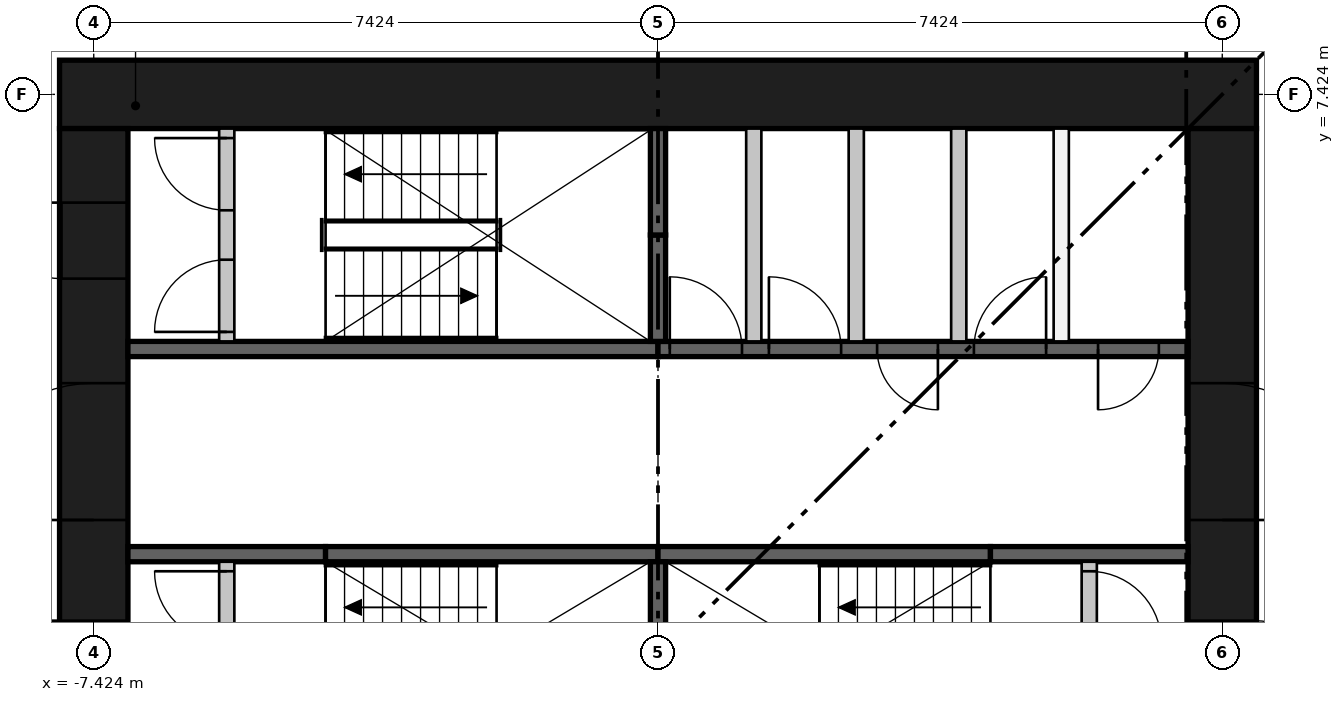
"""IFC4 building model, lengths in metres.
Left out: names, types, materials, properties, quantities, classifications, styles, units other than length and angle.
Written with IfcOpenShell. Run it as: python <this file> out.ifc"""

import sys

from ifc_helpers import new_model, si_unit, direction, frame, frame_2d, origin, place, context, subcontext, project, spatial, rectangle, extrude, element, fill, save


model = new_model("IFC4")
c1 = context("Model", 3, precision=1e-05, world=origin(), true_north=direction((0.0, 1.0)))
c2 = subcontext(c1, "Body", "Model", "MODEL_VIEW")
j1 = project(units=[si_unit("LENGTHUNIT", "METRE"), si_unit("PLANEANGLEUNIT", "RADIAN")], contexts=[c1])
p1 = place(None, origin())
s1 = spatial("IfcSite", under=j1, at=p1, CompositionType="ELEMENT")
p2 = place(p1, origin())
s2 = spatial("IfcBuilding", under=s1, at=p2, CompositionType="ELEMENT")
p3 = place(p2, frame((0.0, 0.0, 55.4)))
s3 = spatial("IfcBuildingStorey", under=s2, at=p3, CompositionType="ELEMENT", Elevation=55.4)
p4 = place(p3, frame((-7.874, 7.424, 0.0), z_axis=(0.0, 0.0, 1.0), x_axis=(1.0, 0.0, 0.0)))
e1 = element("IfcWall", 1, at=p4, inside=s3, PredefinedType="SHEAR", context=c2, shape_type="SweptSolid", body=[
    extrude(rectangle(XDim=15.748, YDim=0.9, at=frame_2d((7.874, 0.0))), origin(), (0.0, 0.0, 1.0), 3.65),
])
p5 = place(p3, frame((-7.424, -6.974, 0.0), z_axis=(0.0, 0.0, 1.0), x_axis=(0.0, 1.0, 0.0)))
e2 = element("IfcWall", 2, at=p5, inside=s3, PredefinedType="SHEAR", context=c2, shape_type="SweptSolid", body=[
    extrude(rectangle(XDim=13.948, YDim=0.9, at=frame_2d((6.974, 0.0))), origin(), (0.0, 0.0, 1.0), 3.65),
])
p6 = place(p5, frame((6.474, 0.0, 0.0)))
e3 = element("IfcOpeningElement", 3, at=p6, cuts=e2, PredefinedType="OPENING", context=c2, shape_type="SweptSolid", body=[
    extrude(rectangle(XDim=1.0, YDim=2.1, at=frame_2d((0.5, 1.05))), frame((0.0, 0.46, 0.0), z_axis=(0.0, -1.0, 0.0), x_axis=(1.0, 0.0, 0.0)), (0.0, 0.0, 1.0), 0.92),
])
p7 = place(p5, frame((3.35, 0.0, 0.0)))
e4 = element("IfcOpeningElement", 4, at=p7, cuts=e2, PredefinedType="OPENING", context=c2, shape_type="SweptSolid", body=[
    extrude(rectangle(XDim=1.8, YDim=2.1, at=frame_2d((0.9, 1.05))), frame((0.0, 0.46, 0.0), z_axis=(0.0, -1.0, 0.0), x_axis=(1.0, 0.0, 0.0)), (0.0, 0.0, 1.0), 0.92),
])
p8 = place(p5, frame((8.799, 0.0, 0.0)))
e5 = element("IfcOpeningElement", 5, at=p8, cuts=e2, PredefinedType="OPENING", context=c2, shape_type="SweptSolid", body=[
    extrude(rectangle(XDim=1.8, YDim=2.1, at=frame_2d((0.9, 1.05))), frame((0.0, 0.46, 0.0), z_axis=(0.0, -1.0, 0.0), x_axis=(1.0, 0.0, 0.0)), (0.0, 0.0, 1.0), 0.92),
])
p9 = place(p5, frame((11.974, 0.0, 0.0)))
e6 = element("IfcOpeningElement", 6, at=p9, cuts=e2, PredefinedType="OPENING", context=c2, shape_type="SweptSolid", body=[
    extrude(rectangle(XDim=1.0, YDim=2.1, at=frame_2d((0.5, 1.05))), frame((0.0, 0.46, 0.0), z_axis=(0.0, -1.0, 0.0), x_axis=(1.0, 0.0, 0.0)), (0.0, 0.0, 1.0), 0.92),
])
p10 = place(p3, frame((7.424, -6.974, 0.0), z_axis=(0.0, 0.0, 1.0), x_axis=(0.0, 1.0, 0.0)))
e7 = element("IfcWall", 7, at=p10, inside=s3, PredefinedType="SHEAR", context=c2, shape_type="SweptSolid", body=[
    extrude(rectangle(XDim=13.948, YDim=0.9, at=frame_2d((6.974, 0.0))), origin(), (0.0, 0.0, 1.0), 3.65),
])
p11 = place(p10, frame((6.474, 0.0, 0.0)))
e8 = element("IfcOpeningElement", 8, at=p11, cuts=e7, PredefinedType="OPENING", context=c2, shape_type="SweptSolid", body=[
    extrude(rectangle(XDim=1.0, YDim=2.1, at=frame_2d((0.5, 1.05))), frame((0.0, 0.46, 0.0), z_axis=(0.0, -1.0, 0.0), x_axis=(1.0, 0.0, 0.0)), (0.0, 0.0, 1.0), 0.92),
])
p12 = place(p10, frame((3.35, 0.0, 0.0)))
e9 = element("IfcOpeningElement", 9, at=p12, cuts=e7, PredefinedType="OPENING", context=c2, shape_type="SweptSolid", body=[
    extrude(rectangle(XDim=1.8, YDim=2.1, at=frame_2d((0.9, 1.05))), frame((0.0, 0.46, 0.0), z_axis=(0.0, -1.0, 0.0), x_axis=(1.0, 0.0, 0.0)), (0.0, 0.0, 1.0), 0.92),
])
p13 = place(p10, frame((8.799, 0.0, 0.0)))
e10 = element("IfcOpeningElement", 10, at=p13, cuts=e7, PredefinedType="OPENING", context=c2, shape_type="SweptSolid", body=[
    extrude(rectangle(XDim=1.8, YDim=2.1, at=frame_2d((0.9, 1.05))), frame((0.0, 0.46, 0.0), z_axis=(0.0, -1.0, 0.0), x_axis=(1.0, 0.0, 0.0)), (0.0, 0.0, 1.0), 0.92),
])
p14 = place(p3, frame((-6.974, 4.074, 0.0), z_axis=(0.0, 0.0, 1.0), x_axis=(1.0, 0.0, 0.0)))
e11 = element("IfcWall", 11, at=p14, inside=s3, PredefinedType="SHEAR", context=c2, shape_type="SweptSolid", body=[
    extrude(rectangle(XDim=6.974, YDim=0.2, at=frame_2d((3.487, 0.0))), origin(), (0.0, 0.0, 1.0), 3.3),
])
p15 = place(p3, frame((0.0, 4.074, 0.0), z_axis=(0.0, 0.0, 1.0), x_axis=(1.0, 0.0, 0.0)))
e12 = element("IfcWall", 12, at=p15, inside=s3, PredefinedType="SHEAR", context=c2, shape_type="SweptSolid", body=[
    extrude(rectangle(XDim=6.974, YDim=0.2, at=frame_2d((3.487, 0.0))), origin(), (0.0, 0.0, 1.0), 3.3),
])
p16 = place(p15, frame((0.155, 0.0, 0.0)))
e13 = element("IfcOpeningElement", 13, at=p16, cuts=e12, PredefinedType="OPENING", context=c2, shape_type="SweptSolid", body=[
    extrude(rectangle(XDim=0.95, YDim=2.1, at=frame_2d((0.475, 1.05))), frame((0.0, 0.11, 0.0), z_axis=(0.0, -1.0, 0.0), x_axis=(1.0, 0.0, 0.0)), (0.0, 0.0, 1.0), 0.22),
])
p17 = place(p15, frame((1.459, 0.0, 0.0)))
e14 = element("IfcOpeningElement", 14, at=p17, cuts=e12, PredefinedType="OPENING", context=c2, shape_type="SweptSolid", body=[
    extrude(rectangle(XDim=0.95, YDim=2.1, at=frame_2d((0.475, 1.05))), frame((0.0, 0.11, 0.0), z_axis=(0.0, -1.0, 0.0), x_axis=(1.0, 0.0, 0.0)), (0.0, 0.0, 1.0), 0.22),
])
p18 = place(p15, frame((2.883, 0.0, 0.0)))
e15 = element("IfcOpeningElement", 15, at=p18, cuts=e12, PredefinedType="OPENING", context=c2, shape_type="SweptSolid", body=[
    extrude(rectangle(XDim=0.8, YDim=2.1, at=frame_2d((0.4, 1.05))), frame((0.0, 0.11, 0.0), z_axis=(0.0, -1.0, 0.0), x_axis=(1.0, 0.0, 0.0)), (0.0, 0.0, 1.0), 0.22),
])
p19 = place(p15, frame((4.156, 0.0, 0.0)))
e16 = element("IfcOpeningElement", 16, at=p19, cuts=e12, PredefinedType="OPENING", context=c2, shape_type="SweptSolid", body=[
    extrude(rectangle(XDim=0.95, YDim=2.1, at=frame_2d((0.475, 1.05))), frame((0.0, 0.11, 0.0), z_axis=(0.0, -1.0, 0.0), x_axis=(1.0, 0.0, 0.0)), (0.0, 0.0, 1.0), 0.22),
])
p20 = place(p15, frame((5.79, 0.0, 0.0)))
e17 = element("IfcOpeningElement", 17, at=p20, cuts=e12, PredefinedType="OPENING", context=c2, shape_type="SweptSolid", body=[
    extrude(rectangle(XDim=0.8, YDim=2.1, at=frame_2d((0.4, 1.05))), frame((0.0, 0.11, 0.0), z_axis=(0.0, -1.0, 0.0), x_axis=(1.0, 0.0, 0.0)), (0.0, 0.0, 1.0), 0.22),
])
p21 = place(p3, frame((-6.974, 1.375, 0.0), z_axis=(0.0, 0.0, 1.0), x_axis=(1.0, 0.0, 0.0)))
e18 = element("IfcWall", 18, at=p21, inside=s3, PredefinedType="SHEAR", context=c2, shape_type="SweptSolid", body=[
    extrude(rectangle(XDim=2.6, YDim=0.2, at=frame_2d((1.3, 0.0))), origin(), (0.0, 0.0, 1.0), 3.3),
])
for number, where, z_axis, x_axis in (
    (19, (-4.374, 1.375, 0.0), (0.0, 0.0, 1.0), (1.0, 0.0, 0.0)),
    (20, (0.0, 1.375, 0.0), (0.0, 0.0, 1.0), (1.0, 0.0, 0.0)),
):
    element("IfcWall", number, at=place(p3, frame(where, z_axis=z_axis, x_axis=x_axis)), inside=s3, PredefinedType="SHEAR", context=c2, shape_type="SweptSolid", body=[
        extrude(rectangle(XDim=4.374, YDim=0.2, at=frame_2d((2.187, 0.0))), origin(), (0.0, 0.0, 1.0), 3.3),
    ])
p22 = place(p3, frame((4.374, 1.375, 0.0), z_axis=(0.0, 0.0, 1.0), x_axis=(1.0, 0.0, 0.0)))
e21 = element("IfcWall", 21, at=p22, inside=s3, PredefinedType="SHEAR", context=c2, shape_type="SweptSolid", body=[
    extrude(rectangle(XDim=2.6, YDim=0.2, at=frame_2d((1.3, 0.0))), origin(), (0.0, 0.0, 1.0), 3.3),
])
p23 = place(p3, frame((0.0, -1.275, 0.0), z_axis=(0.0, 0.0, 1.0), x_axis=(0.0, 1.0, 0.0)))
e22 = element("IfcWall", 22, at=p23, inside=s3, PredefinedType="SHEAR", context=c2, shape_type="SweptSolid", body=[
    extrude(rectangle(XDim=2.55, YDim=0.2, at=frame_2d((1.275, 0.0))), origin(), (0.0, 0.0, 1.0), 3.3),
])
p24 = place(p3, frame((0.0, 4.174, 0.0), z_axis=(0.0, 0.0, 1.0), x_axis=(0.0, 1.0, 0.0)))
e23 = element("IfcWall", 23, at=p24, inside=s3, PredefinedType="SHEAR", context=c2, shape_type="SweptSolid", body=[
    extrude(rectangle(XDim=1.4, YDim=0.2, at=frame_2d((0.7, 0.0))), origin(), (0.0, 0.0, 1.0), 3.3),
])
p25 = place(p3, frame((0.0, 5.574, 0.0), z_axis=(0.0, 0.0, 1.0), x_axis=(0.0, 1.0, 0.0)))
e24 = element("IfcWall", 24, at=p25, inside=s3, PredefinedType="SHEAR", context=c2, shape_type="SweptSolid", body=[
    extrude(rectangle(XDim=1.4, YDim=0.2, at=frame_2d((0.7, 0.0))), origin(), (0.0, 0.0, 1.0), 3.3),
])
for number, where, z_axis, x_axis in (
    (25, (1.26, 4.174, 0.0), (0.0, 0.0, 1.0), (0.0, 1.0, 0.0)),
    (26, (2.609, 4.174, 0.0), (0.0, 0.0, 1.0), (0.0, 1.0, 0.0)),
    (27, (3.957, 4.174, 0.0), (0.0, 0.0, 1.0), (0.0, 1.0, 0.0)),
    (28, (5.305, 4.174, 0.0), (0.0, 0.0, 1.0), (0.0, 1.0, 0.0)),
):
    element("IfcWall", number, at=place(p3, frame(where, z_axis=z_axis, x_axis=x_axis)), inside=s3, PredefinedType="PARTITIONING", context=c2, shape_type="SweptSolid", body=[
        extrude(rectangle(XDim=2.8, YDim=0.2, at=frame_2d((1.4, 0.0))), origin(), (0.0, 0.0, 1.0), 3.3),
    ])
p26 = place(p3, frame((-5.674, -1.275, 0.0), z_axis=(0.0, 0.0, 1.0), x_axis=(0.0, 1.0, 0.0)))
e29 = element("IfcWall", 29, at=p26, inside=s3, PredefinedType="PARTITIONING", context=c2, shape_type="SweptSolid", body=[
    extrude(rectangle(XDim=2.55, YDim=0.2, at=frame_2d((1.275, 0.0))), origin(), (0.0, 0.0, 1.0), 3.3),
])
p27 = place(p26, frame((0.125, 0.0, 0.0)))
e30 = element("IfcOpeningElement", 30, at=p27, cuts=e29, PredefinedType="OPENING", context=c2, shape_type="SweptSolid", body=[
    extrude(rectangle(XDim=0.95, YDim=2.1, at=frame_2d((0.475, 1.05))), frame((0.0, 0.11, 0.0), z_axis=(0.0, -1.0, 0.0), x_axis=(1.0, 0.0, 0.0)), (0.0, 0.0, 1.0), 0.22),
])
p28 = place(p26, frame((1.475, 0.0, 0.0)))
e31 = element("IfcOpeningElement", 31, at=p28, cuts=e29, PredefinedType="OPENING", context=c2, shape_type="SweptSolid", body=[
    extrude(rectangle(XDim=0.95, YDim=2.1, at=frame_2d((0.475, 1.05))), frame((0.0, 0.11, 0.0), z_axis=(0.0, -1.0, 0.0), x_axis=(1.0, 0.0, 0.0)), (0.0, 0.0, 1.0), 0.22),
])
p29 = place(p3, frame((5.674, -1.275, 0.0), z_axis=(0.0, 0.0, 1.0), x_axis=(0.0, 1.0, 0.0)))
e32 = element("IfcWall", 32, at=p29, inside=s3, PredefinedType="PARTITIONING", context=c2, shape_type="SweptSolid", body=[
    extrude(rectangle(XDim=2.55, YDim=0.2, at=frame_2d((1.275, 0.0))), origin(), (0.0, 0.0, 1.0), 3.3),
])
p30 = place(p29, frame((0.125, 0.0, 0.0)))
e33 = element("IfcOpeningElement", 33, at=p30, cuts=e32, PredefinedType="OPENING", context=c2, shape_type="SweptSolid", body=[
    extrude(rectangle(XDim=0.95, YDim=2.1, at=frame_2d((0.475, 1.05))), frame((0.0, 0.11, 0.0), z_axis=(0.0, -1.0, 0.0), x_axis=(1.0, 0.0, 0.0)), (0.0, 0.0, 1.0), 0.22),
])
p31 = place(p29, frame((1.475, 0.0, 0.0)))
e34 = element("IfcOpeningElement", 34, at=p31, cuts=e32, PredefinedType="OPENING", context=c2, shape_type="SweptSolid", body=[
    extrude(rectangle(XDim=0.95, YDim=2.1, at=frame_2d((0.475, 1.05))), frame((0.0, 0.11, 0.0), z_axis=(0.0, -1.0, 0.0), x_axis=(1.0, 0.0, 0.0)), (0.0, 0.0, 1.0), 0.22),
])
p32 = place(p3, frame((-5.674, 4.174, 0.0), z_axis=(0.0, 0.0, 1.0), x_axis=(0.0, 1.0, 0.0)))
e35 = element("IfcWall", 35, at=p32, inside=s3, PredefinedType="PARTITIONING", context=c2, shape_type="SweptSolid", body=[
    extrude(rectangle(XDim=2.8, YDim=0.2, at=frame_2d((1.4, 0.0))), origin(), (0.0, 0.0, 1.0), 3.3),
])
p33 = place(p32, frame((0.125, 0.0, 0.0)))
e36 = element("IfcOpeningElement", 36, at=p33, cuts=e35, PredefinedType="OPENING", context=c2, shape_type="SweptSolid", body=[
    extrude(rectangle(XDim=0.95, YDim=2.1, at=frame_2d((0.475, 1.05))), frame((0.0, 0.11, 0.0), z_axis=(0.0, -1.0, 0.0), x_axis=(1.0, 0.0, 0.0)), (0.0, 0.0, 1.0), 0.22),
])
p34 = place(p32, frame((1.725, 0.0, 0.0)))
e37 = element("IfcOpeningElement", 37, at=p34, cuts=e35, PredefinedType="OPENING", context=c2, shape_type="SweptSolid", body=[
    extrude(rectangle(XDim=0.95, YDim=2.1, at=frame_2d((0.475, 1.05))), frame((0.0, 0.11, 0.0), z_axis=(0.0, -1.0, 0.0), x_axis=(1.0, 0.0, 0.0)), (0.0, 0.0, 1.0), 0.22),
])
p35 = place(p28, origin())
e38 = element("IfcDoor", 38, at=p35, inside=s3, OperationType="SINGLE_SWING_RIGHT", PredefinedType="DOOR", context=c2, shape_type="SweptSolid", body=[
    extrude(rectangle(XDim=0.95, YDim=2.1, at=frame_2d((0.475, 1.05))), frame((0.0, 0.025, 0.0), z_axis=(0.0, -1.0, 0.0), x_axis=(1.0, 0.0, 0.0)), (0.0, 0.0, 1.0), 0.05),
])
fill(e31, e38)
p36 = place(p31, frame((0.95, 0.0, 0.0), z_axis=(0.0, 0.0, 1.0), x_axis=(-1.0, 0.0, 0.0)))
e39 = element("IfcDoor", 39, at=p36, inside=s3, OperationType="SINGLE_SWING_LEFT", PredefinedType="DOOR", context=c2, shape_type="SweptSolid", body=[
    extrude(rectangle(XDim=0.95, YDim=2.1, at=frame_2d((0.475, 1.05))), frame((0.0, 0.025, 0.0), z_axis=(0.0, -1.0, 0.0), x_axis=(1.0, 0.0, 0.0)), (0.0, 0.0, 1.0), 0.05),
])
fill(e34, e39)
p37 = place(p33, origin())
e40 = element("IfcDoor", 40, at=p37, inside=s3, OperationType="SINGLE_SWING_LEFT", PredefinedType="DOOR", context=c2, shape_type="SweptSolid", body=[
    extrude(rectangle(XDim=0.95, YDim=2.1, at=frame_2d((0.475, 1.05))), frame((0.0, 0.025, 0.0), z_axis=(0.0, -1.0, 0.0), x_axis=(1.0, 0.0, 0.0)), (0.0, 0.0, 1.0), 0.05),
])
fill(e36, e40)
p38 = place(p34, origin())
e41 = element("IfcDoor", 41, at=p38, inside=s3, OperationType="SINGLE_SWING_RIGHT", PredefinedType="DOOR", context=c2, shape_type="SweptSolid", body=[
    extrude(rectangle(XDim=0.95, YDim=2.1, at=frame_2d((0.475, 1.05))), frame((0.0, 0.025, 0.0), z_axis=(0.0, -1.0, 0.0), x_axis=(1.0, 0.0, 0.0)), (0.0, 0.0, 1.0), 0.05),
])
fill(e37, e41)
p39 = place(p16, origin())
e42 = element("IfcDoor", 42, at=p39, inside=s3, OperationType="SINGLE_SWING_LEFT", PredefinedType="DOOR", context=c2, shape_type="SweptSolid", body=[
    extrude(rectangle(XDim=0.95, YDim=2.1, at=frame_2d((0.475, 1.05))), frame((0.0, 0.025, 0.0), z_axis=(0.0, -1.0, 0.0), x_axis=(1.0, 0.0, 0.0)), (0.0, 0.0, 1.0), 0.05),
])
fill(e13, e42)
p40 = place(p17, origin())
e43 = element("IfcDoor", 43, at=p40, inside=s3, OperationType="SINGLE_SWING_LEFT", PredefinedType="DOOR", context=c2, shape_type="SweptSolid", body=[
    extrude(rectangle(XDim=0.95, YDim=2.1, at=frame_2d((0.475, 1.05))), frame((0.0, 0.025, 0.0), z_axis=(0.0, -1.0, 0.0), x_axis=(1.0, 0.0, 0.0)), (0.0, 0.0, 1.0), 0.05),
])
fill(e14, e43)
p41 = place(p18, frame((0.8, 0.0, 0.0), z_axis=(0.0, 0.0, 1.0), x_axis=(-1.0, 0.0, 0.0)))
e44 = element("IfcDoor", 44, at=p41, inside=s3, OperationType="SINGLE_SWING_RIGHT", PredefinedType="DOOR", context=c2, shape_type="SweptSolid", body=[
    extrude(rectangle(XDim=0.8, YDim=2.1, at=frame_2d((0.4, 1.05))), frame((0.0, 0.025, 0.0), z_axis=(0.0, -1.0, 0.0), x_axis=(1.0, 0.0, 0.0)), (0.0, 0.0, 1.0), 0.05),
])
fill(e15, e44)
p42 = place(p19, origin())
e45 = element("IfcDoor", 45, at=p42, inside=s3, OperationType="SINGLE_SWING_RIGHT", PredefinedType="DOOR", context=c2, shape_type="SweptSolid", body=[
    extrude(rectangle(XDim=0.95, YDim=2.1, at=frame_2d((0.475, 1.05))), frame((0.0, 0.025, 0.0), z_axis=(0.0, -1.0, 0.0), x_axis=(1.0, 0.0, 0.0)), (0.0, 0.0, 1.0), 0.05),
])
fill(e16, e45)
p43 = place(p20, frame((0.8, 0.0, 0.0), z_axis=(0.0, 0.0, 1.0), x_axis=(-1.0, 0.0, 0.0)))
e46 = element("IfcDoor", 46, at=p43, inside=s3, OperationType="SINGLE_SWING_LEFT", PredefinedType="DOOR", context=c2, shape_type="SweptSolid", body=[
    extrude(rectangle(XDim=0.8, YDim=2.1, at=frame_2d((0.4, 1.05))), frame((0.0, 0.025, 0.0), z_axis=(0.0, -1.0, 0.0), x_axis=(1.0, 0.0, 0.0)), (0.0, 0.0, 1.0), 0.05),
])
fill(e17, e46)
p44 = place(p6, origin())
e47 = element("IfcDoor", 47, at=p44, inside=s3, OperationType="SINGLE_SWING_RIGHT", PredefinedType="DOOR", context=c2, shape_type="SweptSolid", body=[
    extrude(rectangle(XDim=1.0, YDim=2.1, at=frame_2d((0.5, 1.05))), frame((0.0, 0.45, 0.0), z_axis=(0.0, -1.0, 0.0), x_axis=(1.0, 0.0, 0.0)), (0.0, 0.0, 1.0), 0.05),
])
fill(e3, e47)
p45 = place(p8, origin())
e48 = element("IfcDoor", 48, at=p45, inside=s3, OperationType="DOUBLE_DOOR_SINGLE_SWING", PredefinedType="DOOR", context=c2, shape_type="SweptSolid", body=[
    extrude(rectangle(XDim=1.8, YDim=2.1, at=frame_2d((0.9, 1.05))), frame((0.0, 0.025, 0.0), z_axis=(0.0, -1.0, 0.0), x_axis=(1.0, 0.0, 0.0)), (0.0, 0.0, 1.0), 0.05),
])
fill(e5, e48)
p46 = place(p9, origin())
e49 = element("IfcDoor", 49, at=p46, inside=s3, OperationType="SINGLE_SWING_RIGHT", PredefinedType="DOOR", context=c2, shape_type="SweptSolid", body=[
    extrude(rectangle(XDim=1.0, YDim=2.1, at=frame_2d((0.5, 1.05))), frame((0.0, 0.45, 0.0), z_axis=(0.0, -1.0, 0.0), x_axis=(1.0, 0.0, 0.0)), (0.0, 0.0, 1.0), 0.05),
])
fill(e6, e49)
p47 = place(p11, frame((1.0, 0.0, 0.0), z_axis=(0.0, 0.0, 1.0), x_axis=(-1.0, 0.0, 0.0)))
e50 = element("IfcDoor", 50, at=p47, inside=s3, OperationType="SINGLE_SWING_LEFT", PredefinedType="DOOR", context=c2, shape_type="SweptSolid", body=[
    extrude(rectangle(XDim=1.0, YDim=2.1, at=frame_2d((0.5, 1.05))), frame((0.0, 0.45, 0.0), z_axis=(0.0, -1.0, 0.0), x_axis=(1.0, 0.0, 0.0)), (0.0, 0.0, 1.0), 0.05),
])
fill(e8, e50)
p48 = place(p13, frame((1.8, 0.0, 0.0), z_axis=(0.0, 0.0, 1.0), x_axis=(-1.0, 0.0, 0.0)))
e51 = element("IfcDoor", 51, at=p48, inside=s3, OperationType="DOUBLE_DOOR_SINGLE_SWING", PredefinedType="DOOR", context=c2, shape_type="SweptSolid", body=[
    extrude(rectangle(XDim=1.8, YDim=2.1, at=frame_2d((0.9, 1.05))), frame((0.0, 0.025, 0.0), z_axis=(0.0, -1.0, 0.0), x_axis=(1.0, 0.0, 0.0)), (0.0, 0.0, 1.0), 0.05),
])
fill(e10, e51)
save(model, sys.argv[1])
